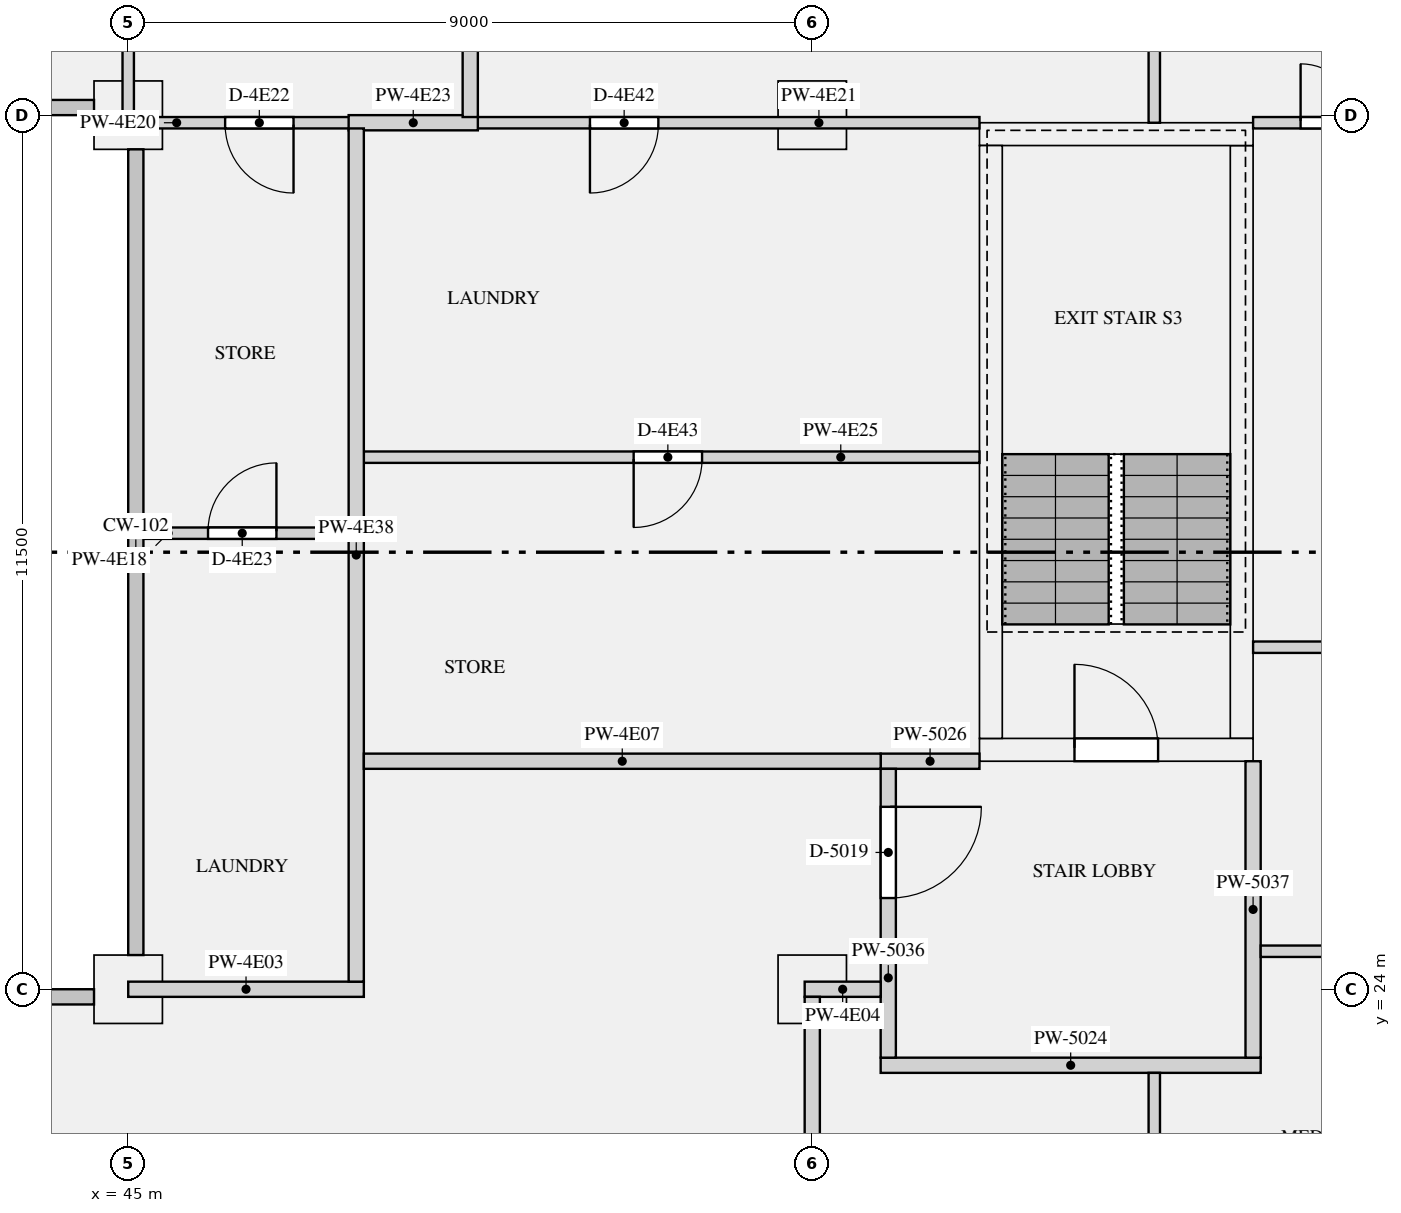
"""IFC4 building model, lengths in metres.
Left out: names, types, materials, properties, quantities, classifications, styles, units other than length and angle.
Written with IfcOpenShell. Run it as: python <this file> out.ifc"""

import sys

from ifc_helpers import new_model, si_unit, direction, frame, frame_2d, origin, origin_2d, place, context, subcontext, project, spatial, rectangle, extrude, element, fill, save


model = new_model("IFC4")
c1 = context("Model", 3, precision=1e-05, world=origin(), true_north=direction((0.0, 1.0)))
c2 = subcontext(c1, "Body", "Model", "MODEL_VIEW")
j1 = project(units=[si_unit("LENGTHUNIT", "METRE"), si_unit("PLANEANGLEUNIT", "RADIAN")], contexts=[c1])
p1 = place(None, origin())
s1 = spatial("IfcSite", under=j1, at=p1, CompositionType="ELEMENT")
p2 = place(p1, origin())
s2 = spatial("IfcBuilding", under=s1, at=p2, CompositionType="ELEMENT")
p3 = place(p2, frame((0.0, 0.0, 232.65)))
s3 = spatial("IfcBuildingStorey", under=s2, at=p3, CompositionType="ELEMENT", Elevation=232.65)
for number, where, z_axis, x_axis in (
    (1, (45.0, 24.0, 0.0), (0.0, 0.0, 1.0), (1.0, 0.0, 0.0)),
    (2, (54.0, 24.0, 0.0), (0.0, 0.0, 1.0), (1.0, 0.0, 0.0)),
    (3, (45.0, 35.5, 0.0), (0.0, 0.0, 1.0), (1.0, 0.0, 0.0)),
    (4, (54.0, 35.5, 0.0), (0.0, 0.0, 1.0), (1.0, 0.0, 0.0)),
):
    element("IfcColumn", number, at=place(p3, frame(where, z_axis=z_axis, x_axis=x_axis)), inside=s3, PredefinedType="COLUMN", context=c2, shape_type="SweptSolid", body=[
        extrude(rectangle(XDim=0.9, YDim=0.9, at=origin_2d()), origin(), (0.0, 0.0, 1.0), 3.15),
    ])
p4 = place(p3, frame((56.2, 27.15, 0.0), z_axis=(0.0, 0.0, 1.0), x_axis=(1.0, 0.0, 0.0)))
e5 = element("IfcWall", 5, at=p4, inside=s3, PredefinedType="SHEAR", context=c2, shape_type="SweptSolid", body=[
    extrude(rectangle(XDim=3.6, YDim=0.3, at=frame_2d((1.8, 0.0))), origin(), (0.0, 0.0, 1.0), 3.15),
])
p5 = place(p4, frame((1.25, 0.0, 0.0)))
e6 = element("IfcOpeningElement", 6, at=p5, cuts=e5, PredefinedType="OPENING", context=c2, shape_type="SweptSolid", body=[
    extrude(rectangle(XDim=1.1, YDim=2.1, at=frame_2d((0.55, 1.05))), frame((0.0, 0.16, 0.0), z_axis=(0.0, -1.0, 0.0), x_axis=(1.0, 0.0, 0.0)), (0.0, 0.0, 1.0), 0.32),
])
p6 = place(p3, frame((56.2, 35.25, 0.0), z_axis=(0.0, 0.0, 1.0), x_axis=(1.0, 0.0, 0.0)))
e7 = element("IfcWall", 7, at=p6, inside=s3, PredefinedType="SHEAR", context=c2, shape_type="SweptSolid", body=[
    extrude(rectangle(XDim=3.6, YDim=0.3, at=frame_2d((1.8, 0.0))), origin(), (0.0, 0.0, 1.0), 3.15),
])
for number, where, z_axis, x_axis in (
    (8, (56.35, 27.3, 0.0), (0.0, 0.0, 1.0), (0.0, 1.0, 0.0)),
    (9, (59.65, 27.3, 0.0), (0.0, 0.0, 1.0), (0.0, 1.0, 0.0)),
):
    element("IfcWall", number, at=place(p3, frame(where, z_axis=z_axis, x_axis=x_axis)), inside=s3, PredefinedType="SHEAR", context=c2, shape_type="SweptSolid", body=[
        extrude(rectangle(XDim=7.8, YDim=0.3, at=frame_2d((3.9, 0.0))), origin(), (0.0, 0.0, 1.0), 3.15),
    ])
p7 = place(p3, frame((54.9, 23.0, 0.0), z_axis=(0.0, 0.0, 1.0), x_axis=(1.0, 0.0, 0.0)))
e10 = element("IfcWall", 10, at=p7, inside=s3, PredefinedType="PARTITIONING", context=c2, shape_type="SweptSolid", body=[
    extrude(rectangle(XDim=5.0, YDim=0.2, at=frame_2d((2.5, 0.0))), origin(), (0.0, 0.0, 1.0), 2.8),
])
p8 = place(p3, frame((54.9, 27.0, 0.0), z_axis=(0.0, 0.0, 1.0), x_axis=(1.0, 0.0, 0.0)))
e11 = element("IfcWall", 11, at=p8, inside=s3, PredefinedType="PARTITIONING", context=c2, shape_type="SweptSolid", body=[
    extrude(rectangle(XDim=1.3, YDim=0.2, at=frame_2d((0.65, 0.0))), origin(), (0.0, 0.0, 1.0), 2.8),
])
p9 = place(p3, frame((55.0, 23.1, 0.0), z_axis=(0.0, 0.0, 1.0), x_axis=(0.0, 1.0, 0.0)))
e12 = element("IfcWall", 12, at=p9, inside=s3, PredefinedType="PARTITIONING", context=c2, shape_type="SweptSolid", body=[
    extrude(rectangle(XDim=3.8, YDim=0.2, at=frame_2d((1.9, 0.0))), origin(), (0.0, 0.0, 1.0), 2.8),
])
p10 = place(p9, frame((2.1, 0.0, 0.0)))
e13 = element("IfcOpeningElement", 13, at=p10, cuts=e12, PredefinedType="OPENING", context=c2, shape_type="SweptSolid", body=[
    extrude(rectangle(XDim=1.2, YDim=2.1, at=frame_2d((0.6, 1.05))), frame((0.0, 0.11, 0.0), z_axis=(0.0, -1.0, 0.0), x_axis=(1.0, 0.0, 0.0)), (0.0, 0.0, 1.0), 0.22),
])
p11 = place(p3, frame((59.8, 23.1, 0.0), z_axis=(0.0, 0.0, 1.0), x_axis=(0.0, 1.0, 0.0)))
e14 = element("IfcWall", 14, at=p11, inside=s3, PredefinedType="PARTITIONING", context=c2, shape_type="SweptSolid", body=[
    extrude(rectangle(XDim=3.9, YDim=0.2, at=frame_2d((1.95, 0.0))), origin(), (0.0, 0.0, 1.0), 2.8),
])
p12 = place(p3, frame((45.0, 24.0, 0.0), z_axis=(0.0, 0.0, 1.0), x_axis=(1.0, 0.0, 0.0)))
e15 = element("IfcWall", 15, at=p12, inside=s3, PredefinedType="PARTITIONING", context=c2, shape_type="SweptSolid", body=[
    extrude(rectangle(XDim=3.1, YDim=0.2, at=frame_2d((1.55, 0.0))), origin(), (0.0, 0.0, 1.0), 2.8),
])
p13 = place(p3, frame((53.9, 24.0, 0.0), z_axis=(0.0, 0.0, 1.0), x_axis=(1.0, 0.0, 0.0)))
e16 = element("IfcWall", 16, at=p13, inside=s3, PredefinedType="PARTITIONING", context=c2, shape_type="SweptSolid", body=[
    extrude(rectangle(XDim=1.0, YDim=0.2, at=frame_2d((0.5, 0.0))), origin(), (0.0, 0.0, 1.0), 2.8),
])
p14 = place(p3, frame((48.1, 27.0, 0.0), z_axis=(0.0, 0.0, 1.0), x_axis=(1.0, 0.0, 0.0)))
e17 = element("IfcWall", 17, at=p14, inside=s3, PredefinedType="PARTITIONING", context=c2, shape_type="SweptSolid", body=[
    extrude(rectangle(XDim=6.8, YDim=0.2, at=frame_2d((3.4, 0.0))), origin(), (0.0, 0.0, 1.0), 2.8),
])
p15 = place(p3, frame((45.0, 30.0, 0.0), z_axis=(0.0, 0.0, 1.0), x_axis=(1.0, 0.0, 0.0)))
e18 = element("IfcWall", 18, at=p15, inside=s3, PredefinedType="PARTITIONING", context=c2, shape_type="SweptSolid", body=[
    extrude(rectangle(XDim=2.9, YDim=0.15, at=frame_2d((1.45, 0.0))), origin(), (0.0, 0.0, 1.0), 2.8),
])
p16 = place(p15, frame((1.05, 0.0, 0.0)))
e19 = element("IfcOpeningElement", 19, at=p16, cuts=e18, PredefinedType="OPENING", context=c2, shape_type="SweptSolid", body=[
    extrude(rectangle(XDim=0.9, YDim=2.1, at=frame_2d((0.45, 1.05))), frame((0.0, 0.085, 0.0), z_axis=(0.0, -1.0, 0.0), x_axis=(1.0, 0.0, 0.0)), (0.0, 0.0, 1.0), 0.17),
])
p17 = place(p3, frame((45.0, 35.4, 0.0), z_axis=(0.0, 0.0, 1.0), x_axis=(1.0, 0.0, 0.0)))
e20 = element("IfcWall", 20, at=p17, inside=s3, PredefinedType="PARTITIONING", context=c2, shape_type="SweptSolid", body=[
    extrude(rectangle(XDim=3.1, YDim=0.15, at=frame_2d((1.55, 0.0))), origin(), (0.0, 0.0, 1.0), 2.8),
])
p18 = place(p17, frame((1.275, 0.0, 0.0)))
e21 = element("IfcOpeningElement", 21, at=p18, cuts=e20, PredefinedType="OPENING", context=c2, shape_type="SweptSolid", body=[
    extrude(rectangle(XDim=0.9, YDim=2.1, at=frame_2d((0.45, 1.05))), frame((0.0, 0.085, 0.0), z_axis=(0.0, -1.0, 0.0), x_axis=(1.0, 0.0, 0.0)), (0.0, 0.0, 1.0), 0.17),
])
p19 = place(p3, frame((49.4, 35.4, 0.0), z_axis=(0.0, 0.0, 1.0), x_axis=(1.0, 0.0, 0.0)))
e22 = element("IfcWall", 22, at=p19, inside=s3, PredefinedType="PARTITIONING", context=c2, shape_type="SweptSolid", body=[
    extrude(rectangle(XDim=6.8, YDim=0.15, at=frame_2d((3.4, 0.0))), origin(), (0.0, 0.0, 1.0), 2.8),
])
p20 = place(p19, frame((1.675, 0.0, 0.0)))
e23 = element("IfcOpeningElement", 23, at=p20, cuts=e22, PredefinedType="OPENING", context=c2, shape_type="SweptSolid", body=[
    extrude(rectangle(XDim=0.9, YDim=2.1, at=frame_2d((0.45, 1.05))), frame((0.0, 0.085, 0.0), z_axis=(0.0, -1.0, 0.0), x_axis=(1.0, 0.0, 0.0)), (0.0, 0.0, 1.0), 0.17),
])
p21 = place(p3, frame((59.8, 35.4, 0.0), z_axis=(0.0, 0.0, 1.0), x_axis=(1.0, 0.0, 0.0)))
e24 = element("IfcWall", 24, at=p21, inside=s3, PredefinedType="PARTITIONING", context=c2, shape_type="SweptSolid", body=[
    extrude(rectangle(XDim=7.775, YDim=0.15, at=frame_2d((3.887, 0.0))), origin(), (0.0, 0.0, 1.0), 2.8),
])
p22 = place(p21, frame((0.625, 0.0, 0.0)))
e25 = element("IfcOpeningElement", 25, at=p22, cuts=e24, PredefinedType="OPENING", context=c2, shape_type="SweptSolid", body=[
    extrude(rectangle(XDim=1.5, YDim=2.1, at=frame_2d((0.75, 1.05))), frame((0.0, 0.085, 0.0), z_axis=(0.0, -1.0, 0.0), x_axis=(1.0, 0.0, 0.0)), (0.0, 0.0, 1.0), 0.17),
])
p23 = place(p3, frame((47.9, 35.4, 0.0), z_axis=(0.0, 0.0, 1.0), x_axis=(1.0, 0.0, 0.0)))
e26 = element("IfcWall", 26, at=p23, inside=s3, PredefinedType="PARTITIONING", context=c2, shape_type="SweptSolid", body=[
    extrude(rectangle(XDim=1.7, YDim=0.2, at=frame_2d((0.85, 0.0))), origin(), (0.0, 0.0, 1.0), 2.8),
])
p24 = place(p3, frame((48.1, 31.0, 0.0), z_axis=(0.0, 0.0, 1.0), x_axis=(1.0, 0.0, 0.0)))
e27 = element("IfcWall", 27, at=p24, inside=s3, PredefinedType="PARTITIONING", context=c2, shape_type="SweptSolid", body=[
    extrude(rectangle(XDim=8.1, YDim=0.15, at=frame_2d((4.05, 0.0))), origin(), (0.0, 0.0, 1.0), 2.8),
])
p25 = place(p24, frame((3.55, 0.0, 0.0)))
e28 = element("IfcOpeningElement", 28, at=p25, cuts=e27, PredefinedType="OPENING", context=c2, shape_type="SweptSolid", body=[
    extrude(rectangle(XDim=0.9, YDim=2.1, at=frame_2d((0.45, 1.05))), frame((0.0, 0.085, 0.0), z_axis=(0.0, -1.0, 0.0), x_axis=(1.0, 0.0, 0.0)), (0.0, 0.0, 1.0), 0.17),
])
p26 = place(p3, frame((59.9, 24.5, 0.0), z_axis=(0.0, 0.0, 1.0), x_axis=(1.0, 0.0, 0.0)))
e29 = element("IfcWall", 29, at=p26, inside=s3, PredefinedType="PARTITIONING", context=c2, shape_type="SweptSolid", body=[
    extrude(rectangle(XDim=8.95, YDim=0.15, at=frame_2d((4.475, 0.0))), origin(), (0.0, 0.0, 1.0), 2.8),
])
p27 = place(p26, frame((5.575, 0.0, 0.0)))
e30 = element("IfcOpeningElement", 30, at=p27, cuts=e29, PredefinedType="OPENING", context=c2, shape_type="SweptSolid", body=[
    extrude(rectangle(XDim=1.5, YDim=2.1, at=frame_2d((0.75, 1.05))), frame((0.0, 0.085, 0.0), z_axis=(0.0, -1.0, 0.0), x_axis=(1.0, 0.0, 0.0)), (0.0, 0.0, 1.0), 0.17),
])
p28 = place(p3, frame((59.8, 28.5, 0.0), z_axis=(0.0, 0.0, 1.0), x_axis=(1.0, 0.0, 0.0)))
e31 = element("IfcWall", 31, at=p28, inside=s3, PredefinedType="PARTITIONING", context=c2, shape_type="SweptSolid", body=[
    extrude(rectangle(XDim=9.05, YDim=0.15, at=frame_2d((4.525, 0.0))), origin(), (0.0, 0.0, 1.0), 2.8),
])
p29 = place(p28, frame((1.65, 0.0, 0.0)))
e32 = element("IfcOpeningElement", 32, at=p29, cuts=e31, PredefinedType="OPENING", context=c2, shape_type="SweptSolid", body=[
    extrude(rectangle(XDim=0.9, YDim=2.1, at=frame_2d((0.45, 1.05))), frame((0.0, 0.085, 0.0), z_axis=(0.0, -1.0, 0.0), x_axis=(1.0, 0.0, 0.0)), (0.0, 0.0, 1.0), 0.17),
])
p30 = place(p3, frame((54.0, 16.1, 0.0), z_axis=(0.0, 0.0, 1.0), x_axis=(0.0, 1.0, 0.0)))
e33 = element("IfcWall", 33, at=p30, inside=s3, PredefinedType="PARTITIONING", context=c2, shape_type="SweptSolid", body=[
    extrude(rectangle(XDim=7.8, YDim=0.2, at=frame_2d((3.9, 0.0))), origin(), (0.0, 0.0, 1.0), 2.8),
])
p31 = place(p30, frame((1.85, 0.0, 0.0)))
e34 = element("IfcOpeningElement", 34, at=p31, cuts=e33, PredefinedType="OPENING", context=c2, shape_type="SweptSolid", body=[
    extrude(rectangle(XDim=1.1, YDim=2.1, at=frame_2d((0.55, 1.05))), frame((0.0, 0.11, 0.0), z_axis=(0.0, -1.0, 0.0), x_axis=(1.0, 0.0, 0.0)), (0.0, 0.0, 1.0), 0.22),
])
p32 = place(p3, frame((48.0, 24.1, 0.0), z_axis=(0.0, 0.0, 1.0), x_axis=(0.0, 1.0, 0.0)))
e35 = element("IfcWall", 35, at=p32, inside=s3, PredefinedType="PARTITIONING", context=c2, shape_type="SweptSolid", body=[
    extrude(rectangle(XDim=11.225, YDim=0.2, at=frame_2d((5.612, 0.0))), origin(), (0.0, 0.0, 1.0), 2.8),
])
p33 = place(p3, frame((45.0, 35.5, 0.0), z_axis=(0.0, 0.0, 1.0), x_axis=(0.0, 1.0, 0.0)))
e36 = element("IfcWall", 36, at=p33, inside=s3, PredefinedType="PARTITIONING", context=c2, shape_type="SweptSolid", body=[
    extrude(rectangle(XDim=5.35, YDim=0.15, at=frame_2d((2.675, 0.0))), origin(), (0.0, 0.0, 1.0), 2.8),
])
p34 = place(p33, frame((2.525, 0.0, 0.0)))
e37 = element("IfcOpeningElement", 37, at=p34, cuts=e36, PredefinedType="OPENING", context=c2, shape_type="SweptSolid", body=[
    extrude(rectangle(XDim=0.9, YDim=2.1, at=frame_2d((0.45, 1.05))), frame((0.0, 0.085, 0.0), z_axis=(0.0, -1.0, 0.0), x_axis=(1.0, 0.0, 0.0)), (0.0, 0.0, 1.0), 0.17),
])
p35 = place(p3, frame((49.5, 35.475, 0.0), z_axis=(0.0, 0.0, 1.0), x_axis=(0.0, 1.0, 0.0)))
e38 = element("IfcWall", 38, at=p35, inside=s3, PredefinedType="PARTITIONING", context=c2, shape_type="SweptSolid", body=[
    extrude(rectangle(XDim=5.375, YDim=0.2, at=frame_2d((2.688, 0.0))), origin(), (0.0, 0.0, 1.0), 2.8),
])
p36 = place(p3, frame((58.5, 12.575, 0.0), z_axis=(0.0, 0.0, 1.0), x_axis=(0.0, 1.0, 0.0)))
e39 = element("IfcWall", 39, at=p36, inside=s3, PredefinedType="PARTITIONING", context=c2, shape_type="SweptSolid", body=[
    extrude(rectangle(XDim=10.325, YDim=0.15, at=frame_2d((5.163, 0.0))), origin(), (0.0, 0.0, 1.0), 2.8),
])
p37 = place(p36, frame((1.475, 0.0, 0.0)))
e40 = element("IfcOpeningElement", 40, at=p37, cuts=e39, PredefinedType="OPENING", context=c2, shape_type="SweptSolid", body=[
    extrude(rectangle(XDim=0.9, YDim=2.1, at=frame_2d((0.45, 1.05))), frame((0.0, 0.085, 0.0), z_axis=(0.0, -1.0, 0.0), x_axis=(1.0, 0.0, 0.0)), (0.0, 0.0, 1.0), 0.17),
])
p38 = place(p36, frame((4.725, 0.0, 0.0)))
e41 = element("IfcOpeningElement", 41, at=p38, cuts=e39, PredefinedType="OPENING", context=c2, shape_type="SweptSolid", body=[
    extrude(rectangle(XDim=0.9, YDim=2.1, at=frame_2d((0.45, 1.05))), frame((0.0, 0.085, 0.0), z_axis=(0.0, -1.0, 0.0), x_axis=(1.0, 0.0, 0.0)), (0.0, 0.0, 1.0), 0.17),
])
p39 = place(p36, frame((8.0, 0.0, 0.0)))
e42 = element("IfcOpeningElement", 42, at=p39, cuts=e39, PredefinedType="OPENING", context=c2, shape_type="SweptSolid", body=[
    extrude(rectangle(XDim=0.9, YDim=2.1, at=frame_2d((0.45, 1.05))), frame((0.0, 0.085, 0.0), z_axis=(0.0, -1.0, 0.0), x_axis=(1.0, 0.0, 0.0)), (0.0, 0.0, 1.0), 0.17),
])
p40 = place(p3, frame((58.5, 35.4, 0.0), z_axis=(0.0, 0.0, 1.0), x_axis=(0.0, 1.0, 0.0)))
e43 = element("IfcWall", 43, at=p40, inside=s3, PredefinedType="PARTITIONING", context=c2, shape_type="SweptSolid", body=[
    extrude(rectangle(XDim=5.45, YDim=0.15, at=frame_2d((2.725, 0.0))), origin(), (0.0, 0.0, 1.0), 2.8),
])
p41 = place(p40, frame((2.05, 0.0, 0.0)))
e44 = element("IfcOpeningElement", 44, at=p41, cuts=e43, PredefinedType="OPENING", context=c2, shape_type="SweptSolid", body=[
    extrude(rectangle(XDim=1.5, YDim=2.1, at=frame_2d((0.75, 1.05))), frame((0.0, 0.085, 0.0), z_axis=(0.0, -1.0, 0.0), x_axis=(1.0, 0.0, 0.0)), (0.0, 0.0, 1.0), 0.17),
])
p42 = place(p5, origin())
e45 = element("IfcDoor", 45, at=p42, inside=s3, OperationType="SINGLE_SWING_LEFT", PredefinedType="DOOR", context=c2, shape_type="SweptSolid", body=[
    extrude(rectangle(XDim=1.1, YDim=2.1, at=frame_2d((0.55, 1.05))), frame((0.0, 0.025, 0.0), z_axis=(0.0, -1.0, 0.0), x_axis=(1.0, 0.0, 0.0)), (0.0, 0.0, 1.0), 0.05),
])
fill(e6, e45)
p43 = place(p10, frame((1.2, 0.0, 0.0), z_axis=(0.0, 0.0, 1.0), x_axis=(-1.0, 0.0, 0.0)))
e46 = element("IfcDoor", 46, at=p43, inside=s3, OperationType="SINGLE_SWING_LEFT", PredefinedType="DOOR", context=c2, shape_type="SweptSolid", body=[
    extrude(rectangle(XDim=1.2, YDim=2.1, at=frame_2d((0.6, 1.05))), frame((0.0, 0.025, 0.0), z_axis=(0.0, -1.0, 0.0), x_axis=(1.0, 0.0, 0.0)), (0.0, 0.0, 1.0), 0.05),
])
fill(e13, e46)
p44 = place(p18, frame((0.9, 0.0, 0.0), z_axis=(0.0, 0.0, 1.0), x_axis=(-1.0, 0.0, 0.0)))
e47 = element("IfcDoor", 47, at=p44, inside=s3, OperationType="SINGLE_SWING_LEFT", PredefinedType="DOOR", context=c2, shape_type="SweptSolid", body=[
    extrude(rectangle(XDim=0.9, YDim=2.1, at=frame_2d((0.45, 1.05))), frame((0.0, 0.025, 0.0), z_axis=(0.0, -1.0, 0.0), x_axis=(1.0, 0.0, 0.0)), (0.0, 0.0, 1.0), 0.05),
])
fill(e21, e47)
p45 = place(p16, origin())
e48 = element("IfcDoor", 48, at=p45, inside=s3, OperationType="SINGLE_SWING_RIGHT", PredefinedType="DOOR", context=c2, shape_type="SweptSolid", body=[
    extrude(rectangle(XDim=0.9, YDim=2.1, at=frame_2d((0.45, 1.05))), frame((0.0, 0.025, 0.0), z_axis=(0.0, -1.0, 0.0), x_axis=(1.0, 0.0, 0.0)), (0.0, 0.0, 1.0), 0.05),
])
fill(e19, e48)
p46 = place(p22, origin())
e49 = element("IfcDoor", 49, at=p46, inside=s3, OperationType="DOUBLE_DOOR_SINGLE_SWING", PredefinedType="DOOR", context=c2, shape_type="SweptSolid", body=[
    extrude(rectangle(XDim=1.5, YDim=2.1, at=frame_2d((0.75, 1.05))), frame((0.0, 0.025, 0.0), z_axis=(0.0, -1.0, 0.0), x_axis=(1.0, 0.0, 0.0)), (0.0, 0.0, 1.0), 0.05),
])
fill(e25, e49)
p47 = place(p20, frame((0.9, 0.0, 0.0), z_axis=(0.0, 0.0, 1.0), x_axis=(-1.0, 0.0, 0.0)))
e50 = element("IfcDoor", 50, at=p47, inside=s3, OperationType="SINGLE_SWING_RIGHT", PredefinedType="DOOR", context=c2, shape_type="SweptSolid", body=[
    extrude(rectangle(XDim=0.9, YDim=2.1, at=frame_2d((0.45, 1.05))), frame((0.0, 0.025, 0.0), z_axis=(0.0, -1.0, 0.0), x_axis=(1.0, 0.0, 0.0)), (0.0, 0.0, 1.0), 0.05),
])
fill(e23, e50)
p48 = place(p25, frame((0.9, 0.0, 0.0), z_axis=(0.0, 0.0, 1.0), x_axis=(-1.0, 0.0, 0.0)))
e51 = element("IfcDoor", 51, at=p48, inside=s3, OperationType="SINGLE_SWING_RIGHT", PredefinedType="DOOR", context=c2, shape_type="SweptSolid", body=[
    extrude(rectangle(XDim=0.9, YDim=2.1, at=frame_2d((0.45, 1.05))), frame((0.0, 0.025, 0.0), z_axis=(0.0, -1.0, 0.0), x_axis=(1.0, 0.0, 0.0)), (0.0, 0.0, 1.0), 0.05),
])
fill(e28, e51)
save(model, sys.argv[1])
